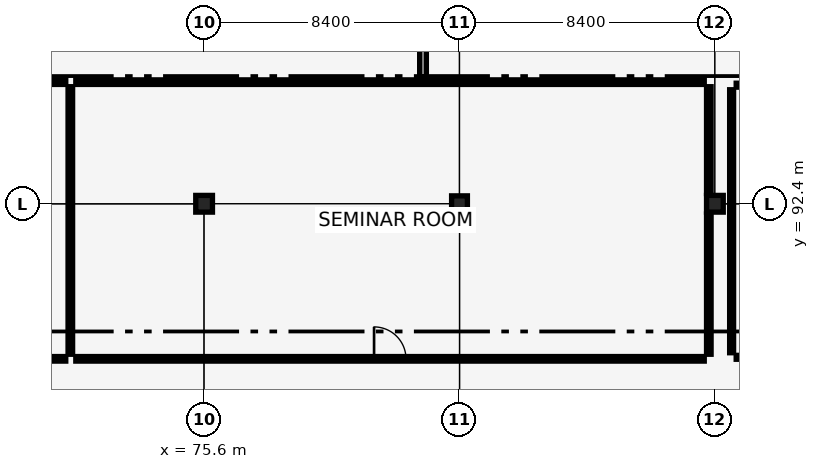
"""IFC4 building model, lengths in metres.
Left out: names, types, materials, properties, quantities, classifications, styles, units other than length and angle.
Written with IfcOpenShell. Run it as: python <this file> out.ifc"""

import sys

from ifc_helpers import new_model, si_unit, direction, frame, frame_2d, origin, origin_2d, place, context, subcontext, project, spatial, rectangle, extrude, element, fill, save


model = new_model("IFC4")
c1 = context("Model", 3, precision=1e-05, world=origin(), true_north=direction((0.0, 1.0)))
c2 = subcontext(c1, "Body", "Model", "MODEL_VIEW")
j1 = project(units=[si_unit("LENGTHUNIT", "METRE"), si_unit("PLANEANGLEUNIT", "RADIAN")], contexts=[c1])
p1 = place(None, origin())
s1 = spatial("IfcSite", under=j1, at=p1, CompositionType="ELEMENT")
p2 = place(p1, origin())
s2 = spatial("IfcBuilding", under=s1, at=p2, CompositionType="ELEMENT")
p3 = place(p2, origin())
s3 = spatial("IfcBuildingStorey", under=s2, at=p3, CompositionType="ELEMENT", Elevation=0.0)
p4 = place(p3, frame((75.6, 92.4, -0.32), z_axis=(0.0, 0.0, 1.0), x_axis=(1.0, 0.0, 0.0)))
e1 = element("IfcColumn", 1, at=p4, inside=s3, PredefinedType="COLUMN", context=c2, shape_type="SweptSolid", body=[
    extrude(rectangle(XDim=0.55, YDim=0.55, at=origin_2d()), origin(), (0.0, 0.0, 1.0), 5.46),
])
p5 = place(p3, frame((84.0, 92.4, -0.32), z_axis=(0.0, 0.0, 1.0), x_axis=(1.0, 0.0, 0.0)))
e2 = element("IfcColumn", 2, at=p5, inside=s3, PredefinedType="COLUMN", context=c2, shape_type="SweptSolid", body=[
    extrude(rectangle(XDim=0.52, YDim=0.52, at=origin_2d()), origin(), (0.0, 0.0, 1.0), 5.46),
])
p6 = place(p3, frame((92.4, 92.4, -0.32), z_axis=(0.0, 0.0, 1.0), x_axis=(1.0, 0.0, 0.0)))
e3 = element("IfcColumn", 3, at=p6, inside=s3, PredefinedType="COLUMN", context=c2, shape_type="SweptSolid", body=[
    extrude(rectangle(XDim=0.55, YDim=0.55, at=origin_2d()), origin(), (0.0, 0.0, 1.0), 5.46),
])
p7 = place(p3, frame((50.43, 87.3, 0.0), z_axis=(0.0, 0.0, 1.0), x_axis=(1.0, 0.0, 0.0)))
e4 = element("IfcWall", 4, at=p7, inside=s3, PredefinedType="PARTITIONING", context=c2, shape_type="SweptSolid", body=[
    extrude(rectangle(XDim=20.62, YDim=0.15, at=frame_2d((10.31, 0.0))), origin(), (0.0, 0.0, 1.0), 4.49),
])
p8 = place(p7, frame((9.785, 0.0, 0.0)))
e5 = element("IfcOpeningElement", 5, at=p8, cuts=e4, PredefinedType="OPENING", context=c2, shape_type="SweptSolid", body=[
    extrude(rectangle(XDim=1.05, YDim=2.15, at=frame_2d((0.525, 1.075))), frame((0.0, 0.085, 0.0), z_axis=(0.0, -1.0, 0.0), x_axis=(1.0, 0.0, 0.0)), (0.0, 0.0, 1.0), 0.17),
])
p9 = place(p3, frame((50.75, 96.4, 0.0), z_axis=(0.0, 0.0, 1.0), x_axis=(1.0, 0.0, 0.0)))
e6 = element("IfcWall", 6, at=p9, inside=s3, PredefinedType="PARTITIONING", context=c2, shape_type="SweptSolid", body=[
    extrude(rectangle(XDim=20.3, YDim=0.15, at=frame_2d((10.15, 0.0))), origin(), (0.0, 0.0, 1.0), 4.74),
])
p10 = place(p3, frame((71.2, 87.45, 0.0), z_axis=(0.0, 0.0, 1.0), x_axis=(0.0, 1.0, 0.0)))
e7 = element("IfcWall", 7, at=p10, inside=s3, PredefinedType="PARTITIONING", context=c2, shape_type="SweptSolid", body=[
    extrude(rectangle(XDim=8.8, YDim=0.15, at=frame_2d((4.4, 0.0))), origin(), (0.0, 0.0, 1.0), 4.46),
])
p11 = place(p3, frame((71.38, 87.3, 0.0), z_axis=(0.0, 0.0, 1.0), x_axis=(1.0, 0.0, 0.0)))
e8 = element("IfcWall", 8, at=p11, inside=s3, PredefinedType="PARTITIONING", context=c2, shape_type="SweptSolid", body=[
    extrude(rectangle(XDim=20.67, YDim=0.15, at=frame_2d((10.335, 0.0))), origin(), (0.0, 0.0, 1.0), 4.49),
])
p12 = place(p11, frame((9.81, 0.0, 0.0)))
e9 = element("IfcOpeningElement", 9, at=p12, cuts=e8, PredefinedType="OPENING", context=c2, shape_type="SweptSolid", body=[
    extrude(rectangle(XDim=1.05, YDim=2.15, at=frame_2d((0.525, 1.075))), frame((0.0, 0.085, 0.0), z_axis=(0.0, -1.0, 0.0), x_axis=(1.0, 0.0, 0.0)), (0.0, 0.0, 1.0), 0.17),
])
p13 = place(p3, frame((71.38, 96.4, 0.0), z_axis=(0.0, 0.0, 1.0), x_axis=(1.0, 0.0, 0.0)))
e10 = element("IfcWall", 10, at=p13, inside=s3, PredefinedType="PARTITIONING", context=c2, shape_type="SweptSolid", body=[
    extrude(rectangle(XDim=20.67, YDim=0.15, at=frame_2d((10.335, 0.0))), origin(), (0.0, 0.0, 1.0), 4.74),
])
p14 = place(p3, frame((92.2, 87.45, 0.0), z_axis=(0.0, 0.0, 1.0), x_axis=(0.0, 1.0, 0.0)))
e11 = element("IfcWall", 11, at=p14, inside=s3, PredefinedType="PARTITIONING", context=c2, shape_type="SweptSolid", body=[
    extrude(rectangle(XDim=4.615, YDim=0.15, at=frame_2d((2.308, 0.0))), origin(), (0.0, 0.0, 1.0), 4.59),
])
p15 = place(p3, frame((92.2, 92.735, 0.0), z_axis=(0.0, 0.0, 1.0), x_axis=(0.0, 1.0, 0.0)))
e12 = element("IfcWall", 12, at=p15, inside=s3, PredefinedType="PARTITIONING", context=c2, shape_type="SweptSolid", body=[
    extrude(rectangle(XDim=3.515, YDim=0.15, at=frame_2d((1.757, 0.0))), origin(), (0.0, 0.0, 1.0), 5.14),
])
p16 = place(p3, frame((93.1, 87.35, 0.0), z_axis=(0.0, 0.0, 1.0), x_axis=(1.0, 0.0, 0.0)))
e13 = element("IfcWall", 13, at=p16, inside=s3, PredefinedType="PARTITIONING", context=c2, shape_type="SweptSolid", body=[
    extrude(rectangle(XDim=7.67, YDim=0.13, at=frame_2d((3.835, 0.0))), origin(), (0.0, 0.0, 1.0), 4.49),
])
p17 = place(p16, frame((3.385, 0.0, 0.0)))
e14 = element("IfcOpeningElement", 14, at=p17, cuts=e13, PredefinedType="OPENING", context=c2, shape_type="SweptSolid", body=[
    extrude(rectangle(XDim=0.9, YDim=2.1, at=frame_2d((0.45, 1.05))), frame((0.0, 0.075, 0.0), z_axis=(0.0, -1.0, 0.0), x_axis=(1.0, 0.0, 0.0)), (0.0, 0.0, 1.0), 0.15),
])
p18 = place(p3, frame((93.1, 96.3, 0.0), z_axis=(0.0, 0.0, 1.0), x_axis=(1.0, 0.0, 0.0)))
e15 = element("IfcWall", 15, at=p18, inside=s3, PredefinedType="PARTITIONING", context=c2, shape_type="SweptSolid", body=[
    extrude(rectangle(XDim=7.0, YDim=0.13, at=frame_2d((3.5, 0.0))), origin(), (0.0, 0.0, 1.0), 5.14),
])
p19 = place(p3, frame((92.95, 87.5, 0.0), z_axis=(0.0, 0.0, 1.0), x_axis=(0.0, 1.0, 0.0)))
e16 = element("IfcWall", 16, at=p19, inside=s3, PredefinedType="PARTITIONING", context=c2, shape_type="SweptSolid", body=[
    extrude(rectangle(XDim=8.65, YDim=0.13, at=frame_2d((4.325, 0.0))), origin(), (0.0, 0.0, 1.0), 4.46),
])
p20 = place(p3, frame((82.8, 96.58, 0.0), z_axis=(0.0, 0.0, 1.0), x_axis=(0.0, 1.0, 0.0)))
e17 = element("IfcWall", 17, at=p20, inside=s3, PredefinedType="PARTITIONING", context=c2, shape_type="SweptSolid", body=[
    extrude(rectangle(XDim=20.84, YDim=0.22, at=frame_2d((10.42, 0.0))), origin(), (0.0, 0.0, 1.0), 3.74),
])
p21 = place(p20, frame((9.57, 0.0, 0.0)))
e18 = element("IfcOpeningElement", 18, at=p21, cuts=e17, PredefinedType="OPENING", context=c2, shape_type="SweptSolid", body=[
    extrude(rectangle(XDim=1.7, YDim=2.25, at=frame_2d((0.85, 1.125))), frame((0.0, 0.12, 0.0), z_axis=(0.0, -1.0, 0.0), x_axis=(1.0, 0.0, 0.0)), (0.0, 0.0, 1.0), 0.24),
])
p22 = place(p12, origin())
e19 = element("IfcDoor", 19, at=p22, inside=s3, OperationType="SINGLE_SWING_LEFT", PredefinedType="DOOR", context=c2, shape_type="SweptSolid", body=[
    extrude(rectangle(XDim=1.05, YDim=2.15, at=frame_2d((0.525, 1.075))), frame((0.0, 0.025, 0.0), z_axis=(0.0, -1.0, 0.0), x_axis=(1.0, 0.0, 0.0)), (0.0, 0.0, 1.0), 0.05),
])
fill(e9, e19)
save(model, sys.argv[1])
